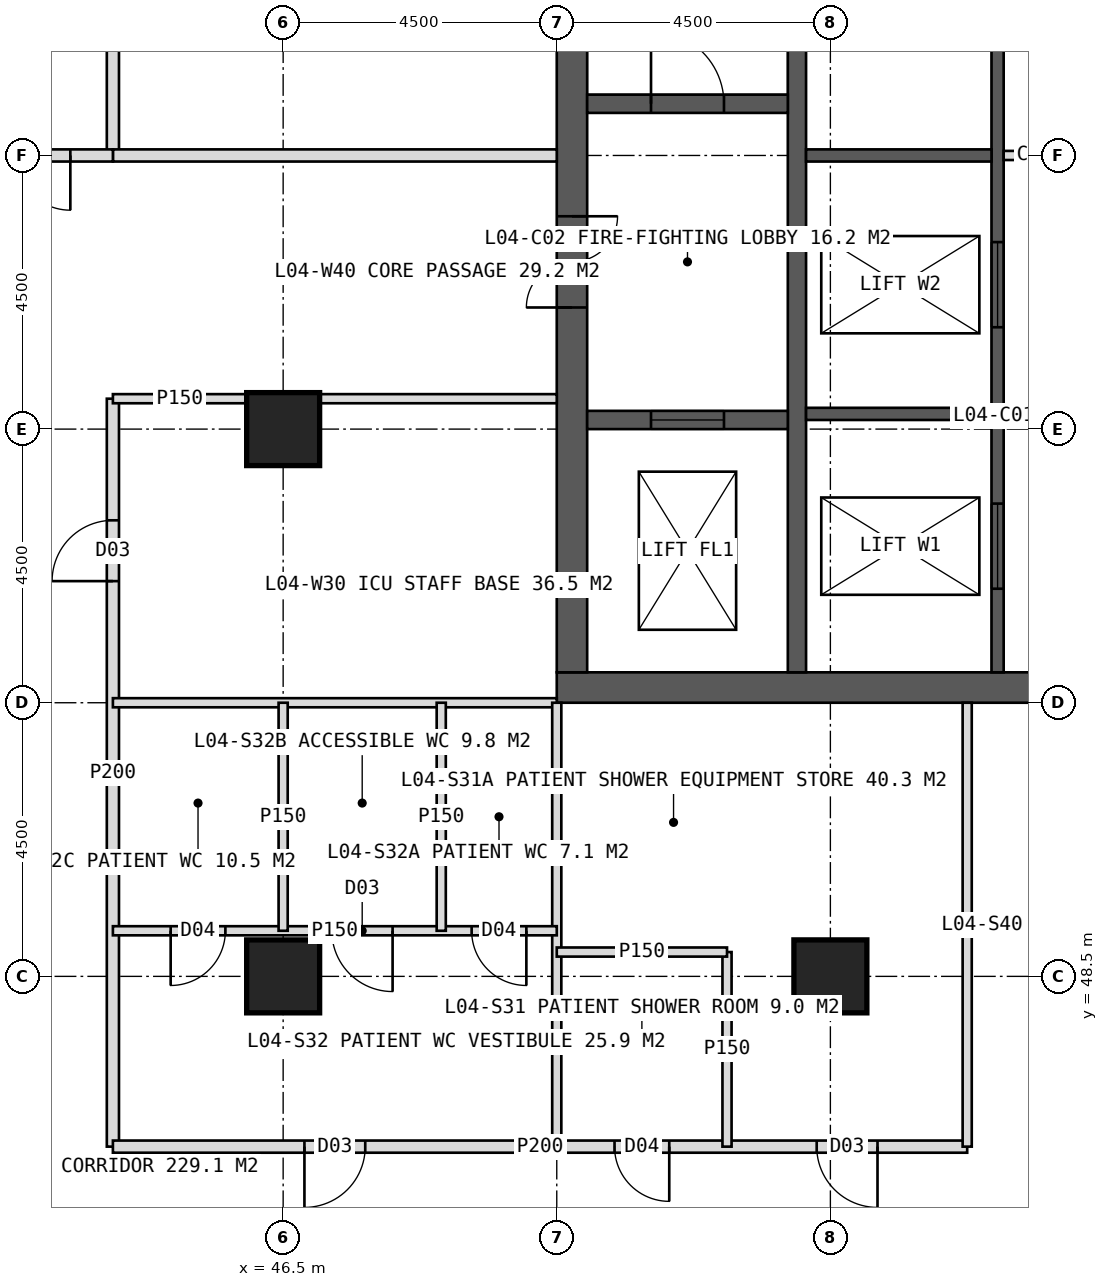
"""IFC4 building model, lengths in metres.
Left out: names, types, materials, properties, quantities, classifications, styles, units other than length and angle.
Written with IfcOpenShell. Run it as: python <this file> out.ifc"""

import sys

from ifc_helpers import new_model, si_unit, direction, frame, frame_2d, origin, origin_2d, place, context, subcontext, project, spatial, rectangle, hollow_rectangle, extrude, element, fill, save


model = new_model("IFC4")
c1 = context("Model", 3, precision=1e-05, world=origin(), true_north=direction((0.0, 1.0)))
c2 = subcontext(c1, "Body", "Model", "MODEL_VIEW")
j1 = project(units=[si_unit("LENGTHUNIT", "METRE"), si_unit("PLANEANGLEUNIT", "RADIAN")], contexts=[c1])
p1 = place(None, origin())
s1 = spatial("IfcSite", under=j1, at=p1, CompositionType="ELEMENT")
p2 = place(p1, origin())
s2 = spatial("IfcBuilding", under=s1, at=p2, CompositionType="ELEMENT")
p3 = place(p2, frame((0.0, 0.0, 21.0)))
s3 = spatial("IfcBuildingStorey", under=s2, at=p3, CompositionType="ELEMENT", Elevation=21.0)
p4 = place(p3, frame((51.0, 53.25, 0.0), z_axis=(0.0, 0.0, 1.0), x_axis=(1.0, 0.0, 0.0)))
e1 = element("IfcWall", 1, at=p4, inside=s3, PredefinedType="SHEAR", context=c2, shape_type="SweptSolid", body=[
    extrude(rectangle(XDim=18.0, YDim=0.5, at=frame_2d((9.0, 0.0))), origin(), (0.0, 0.0, 1.0), 5.0),
])
p5 = place(p4, frame((8.1, 0.0, 0.0)))
e2 = element("IfcOpeningElement", 2, at=p5, cuts=e1, PredefinedType="OPENING", context=c2, shape_type="SweptSolid", body=[
    extrude(rectangle(XDim=1.8, YDim=2.2, at=frame_2d((0.9, 1.1))), frame((0.0, 0.26, 0.0), z_axis=(0.0, -1.0, 0.0), x_axis=(1.0, 0.0, 0.0)), (0.0, 0.0, 1.0), 0.52),
])
p6 = place(p3, frame((51.25, 53.5, 0.0), z_axis=(0.0, 0.0, 1.0), x_axis=(0.0, 1.0, 0.0)))
e3 = element("IfcWall", 3, at=p6, inside=s3, PredefinedType="SHEAR", context=c2, shape_type="SweptSolid", body=[
    extrude(rectangle(XDim=17.0, YDim=0.5, at=frame_2d((8.5, 0.0))), origin(), (0.0, 0.0, 1.0), 5.0),
])
p7 = place(p6, frame((6.0, 0.0, 0.0)))
e4 = element("IfcOpeningElement", 4, at=p7, cuts=e3, PredefinedType="OPENING", context=c2, shape_type="SweptSolid", body=[
    extrude(rectangle(XDim=1.5, YDim=2.2, at=frame_2d((0.75, 1.1))), frame((0.0, 0.26, 0.0), z_axis=(0.0, -1.0, 0.0), x_axis=(1.0, 0.0, 0.0)), (0.0, 0.0, 1.0), 0.52),
])
p8 = place(p3, frame((54.95, 53.5, 0.0), z_axis=(0.0, 0.0, 1.0), x_axis=(0.0, 1.0, 0.0)))
e5 = element("IfcWall", 5, at=p8, inside=s3, PredefinedType="SHEAR", context=c2, shape_type="SweptSolid", body=[
    extrude(rectangle(XDim=17.0, YDim=0.3, at=frame_2d((8.5, 0.0))), origin(), (0.0, 0.0, 1.0), 5.0),
])
p9 = place(p3, frame((58.25, 53.5, 0.0), z_axis=(0.0, 0.0, 1.0), x_axis=(0.0, 1.0, 0.0)))
e6 = element("IfcWall", 6, at=p9, inside=s3, PredefinedType="SHEAR", context=c2, shape_type="SweptSolid", body=[
    extrude(rectangle(XDim=17.0, YDim=0.2, at=frame_2d((8.5, 0.0))), origin(), (0.0, 0.0, 1.0), 5.0),
])
p10 = place(p9, frame((1.375, 0.0, 0.0)))
e7 = element("IfcOpeningElement", 7, at=p10, cuts=e6, PredefinedType="OPENING", context=c2, shape_type="SweptSolid", body=[
    extrude(rectangle(XDim=1.4, YDim=2.2, at=frame_2d((0.7, 1.1))), frame((0.0, 0.11, 0.0), z_axis=(0.0, -1.0, 0.0), x_axis=(1.0, 0.0, 0.0)), (0.0, 0.0, 1.0), 0.22),
])
p11 = place(p9, frame((5.675, 0.0, 0.0)))
e8 = element("IfcOpeningElement", 8, at=p11, cuts=e6, PredefinedType="OPENING", context=c2, shape_type="SweptSolid", body=[
    extrude(rectangle(XDim=1.4, YDim=2.2, at=frame_2d((0.7, 1.1))), frame((0.0, 0.11, 0.0), z_axis=(0.0, -1.0, 0.0), x_axis=(1.0, 0.0, 0.0)), (0.0, 0.0, 1.0), 0.22),
])
for number, where, z_axis, x_axis in (
    (9, (55.1, 57.75, 0.0), (0.0, 0.0, 1.0), (1.0, 0.0, 0.0)),
    (10, (55.1, 62.0, 0.0), (0.0, 0.0, 1.0), (1.0, 0.0, 0.0)),
):
    element("IfcWall", number, at=place(p3, frame(where, z_axis=z_axis, x_axis=x_axis)), inside=s3, PredefinedType="SHEAR", context=c2, shape_type="SweptSolid", body=[
        extrude(rectangle(XDim=3.05, YDim=0.2, at=frame_2d((1.525, 0.0))), origin(), (0.0, 0.0, 1.0), 5.0),
    ])
p12 = place(p3, frame((51.5, 62.85, 0.0), z_axis=(0.0, 0.0, 1.0), x_axis=(1.0, 0.0, 0.0)))
e11 = element("IfcWall", 11, at=p12, inside=s3, PredefinedType="SHEAR", context=c2, shape_type="SweptSolid", body=[
    extrude(rectangle(XDim=3.3, YDim=0.3, at=frame_2d((1.65, 0.0))), origin(), (0.0, 0.0, 1.0), 5.0),
])
p13 = place(p12, frame((1.05, 0.0, 0.0)))
e12 = element("IfcOpeningElement", 12, at=p13, cuts=e11, PredefinedType="OPENING", context=c2, shape_type="SweptSolid", body=[
    extrude(rectangle(XDim=1.2, YDim=2.1, at=frame_2d((0.6, 1.05))), frame((0.0, 0.16, 0.0), z_axis=(0.0, -1.0, 0.0), x_axis=(1.0, 0.0, 0.0)), (0.0, 0.0, 1.0), 0.32),
])
p14 = place(p3, frame((51.5, 57.65, 0.0), z_axis=(0.0, 0.0, 1.0), x_axis=(1.0, 0.0, 0.0)))
e13 = element("IfcWall", 13, at=p14, inside=s3, PredefinedType="SHEAR", context=c2, shape_type="SweptSolid", body=[
    extrude(rectangle(XDim=3.3, YDim=0.3, at=frame_2d((1.65, 0.0))), origin(), (0.0, 0.0, 1.0), 5.0),
])
p15 = place(p14, frame((1.05, 0.0, 0.0)))
e14 = element("IfcOpeningElement", 14, at=p15, cuts=e13, PredefinedType="OPENING", context=c2, shape_type="SweptSolid", body=[
    extrude(rectangle(XDim=1.2, YDim=2.2, at=frame_2d((0.6, 1.1))), frame((0.0, 0.16, 0.0), z_axis=(0.0, -1.0, 0.0), x_axis=(1.0, 0.0, 0.0)), (0.0, 0.0, 1.0), 0.32),
])
for number, where, z_axis, x_axis in (
    (15, (46.5, 48.5, 0.0), (0.0, 0.0, 1.0), (1.0, 0.0, 0.0)),
    (16, (55.5, 48.5, 0.0), (0.0, 0.0, 1.0), (1.0, 0.0, 0.0)),
    (17, (46.5, 57.5, 0.0), (0.0, 0.0, 1.0), (1.0, 0.0, 0.0)),
):
    element("IfcColumn", number, at=place(p3, frame(where, z_axis=z_axis, x_axis=x_axis)), inside=s3, PredefinedType="COLUMN", context=c2, shape_type="SweptSolid", body=[
        extrude(hollow_rectangle(XDim=1.2, YDim=1.2, WallThickness=0.1, at=origin_2d()), origin(), (0.0, 0.0, 1.0), 5.0),
    ])
p16 = place(p3, frame((43.7, 45.7, 0.0), z_axis=(0.0, 0.0, 1.0), x_axis=(0.0, 1.0, 0.0)))
e18 = element("IfcWall", 18, at=p16, inside=s3, PredefinedType="PARTITIONING", context=c2, shape_type="SweptSolid", body=[
    extrude(rectangle(XDim=12.3, YDim=0.2, at=frame_2d((6.15, 0.0))), origin(), (0.0, 0.0, 1.0), 4.7),
])
p17 = place(p16, frame((9.3, 0.0, 0.0)))
e19 = element("IfcOpeningElement", 19, at=p17, cuts=e18, PredefinedType="OPENING", context=c2, shape_type="SweptSolid", body=[
    extrude(rectangle(XDim=1.0, YDim=2.1, at=frame_2d((0.5, 1.05))), frame((0.0, 0.11, 0.0), z_axis=(0.0, -1.0, 0.0), x_axis=(1.0, 0.0, 0.0)), (0.0, 0.0, 1.0), 0.22),
])
p18 = place(p3, frame((43.7, 62.0, 0.0), z_axis=(0.0, 0.0, 1.0), x_axis=(0.0, 1.0, 0.0)))
e20 = element("IfcWall", 20, at=p18, inside=s3, PredefinedType="PARTITIONING", context=c2, shape_type="SweptSolid", body=[
    extrude(rectangle(XDim=16.3, YDim=0.2, at=frame_2d((8.15, 0.0))), origin(), (0.0, 0.0, 1.0), 4.7),
])
p19 = place(p18, frame((4.0, 0.0, 0.0)))
e21 = element("IfcOpeningElement", 21, at=p19, cuts=e20, PredefinedType="OPENING", context=c2, shape_type="SweptSolid", body=[
    extrude(rectangle(XDim=1.0, YDim=2.1, at=frame_2d((0.5, 1.05))), frame((0.0, 0.11, 0.0), z_axis=(0.0, -1.0, 0.0), x_axis=(1.0, 0.0, 0.0)), (0.0, 0.0, 1.0), 0.22),
])
p20 = place(p18, frame((12.15, 0.0, 0.0)))
e22 = element("IfcOpeningElement", 22, at=p20, cuts=e20, PredefinedType="OPENING", context=c2, shape_type="SweptSolid", body=[
    extrude(rectangle(XDim=1.0, YDim=2.1, at=frame_2d((0.5, 1.05))), frame((0.0, 0.11, 0.0), z_axis=(0.0, -1.0, 0.0), x_axis=(1.0, 0.0, 0.0)), (0.0, 0.0, 1.0), 0.22),
])
p21 = place(p3, frame((51.0, 53.0, 0.0), z_axis=(0.0, 0.0, 1.0), x_axis=(-1.0, 0.0, 0.0)))
e23 = element("IfcWall", 23, at=p21, inside=s3, PredefinedType="PARTITIONING", context=c2, shape_type="SweptSolid", body=[
    extrude(rectangle(XDim=7.3, YDim=0.15, at=frame_2d((3.65, 0.0))), origin(), (0.0, 0.0, 1.0), 4.7),
])
p22 = place(p3, frame((51.0, 58.0, 0.0), z_axis=(0.0, 0.0, 1.0), x_axis=(-1.0, 0.0, 0.0)))
e24 = element("IfcWall", 24, at=p22, inside=s3, PredefinedType="PARTITIONING", context=c2, shape_type="SweptSolid", body=[
    extrude(rectangle(XDim=3.9, YDim=0.15, at=frame_2d((1.95, 0.0))), origin(), (0.0, 0.0, 1.0), 4.7),
])
p23 = place(p3, frame((45.9, 58.0, 0.0), z_axis=(0.0, 0.0, 1.0), x_axis=(-1.0, 0.0, 0.0)))
e25 = element("IfcWall", 25, at=p23, inside=s3, PredefinedType="PARTITIONING", context=c2, shape_type="SweptSolid", body=[
    extrude(rectangle(XDim=2.2, YDim=0.15, at=frame_2d((1.1, 0.0))), origin(), (0.0, 0.0, 1.0), 4.7),
])
p24 = place(p3, frame((51.0, 62.0, 0.0), z_axis=(0.0, 0.0, 1.0), x_axis=(-1.0, 0.0, 0.0)))
e26 = element("IfcWall", 26, at=p24, inside=s3, PredefinedType="SOLIDWALL", context=c2, shape_type="SweptSolid", body=[
    extrude(rectangle(XDim=7.3, YDim=0.2, at=frame_2d((3.65, 0.0))), origin(), (0.0, 0.0, 1.0), 3.7),
])
p25 = place(p3, frame((57.75, 45.7, 0.0), z_axis=(0.0, 0.0, 1.0), x_axis=(-1.0, 0.0, 0.0)))
e27 = element("IfcWall", 27, at=p25, inside=s3, PredefinedType="PARTITIONING", context=c2, shape_type="SweptSolid", body=[
    extrude(rectangle(XDim=14.05, YDim=0.2, at=frame_2d((7.025, 0.0))), origin(), (0.0, 0.0, 1.0), 4.7),
])
p26 = place(p25, frame((9.9, 0.0, 0.0)))
e28 = element("IfcOpeningElement", 28, at=p26, cuts=e27, PredefinedType="OPENING", context=c2, shape_type="SweptSolid", body=[
    extrude(rectangle(XDim=1.0, YDim=2.1, at=frame_2d((0.5, 1.05))), frame((0.0, 0.11, 0.0), z_axis=(0.0, -1.0, 0.0), x_axis=(1.0, 0.0, 0.0)), (0.0, 0.0, 1.0), 0.22),
])
p27 = place(p25, frame((4.9, 0.0, 0.0)))
e29 = element("IfcOpeningElement", 29, at=p27, cuts=e27, PredefinedType="OPENING", context=c2, shape_type="SweptSolid", body=[
    extrude(rectangle(XDim=0.9, YDim=2.1, at=frame_2d((0.45, 1.05))), frame((0.0, 0.11, 0.0), z_axis=(0.0, -1.0, 0.0), x_axis=(1.0, 0.0, 0.0)), (0.0, 0.0, 1.0), 0.22),
])
p28 = place(p25, frame((1.475, 0.0, 0.0)))
e30 = element("IfcOpeningElement", 30, at=p28, cuts=e27, PredefinedType="OPENING", context=c2, shape_type="SweptSolid", body=[
    extrude(rectangle(XDim=1.0, YDim=2.1, at=frame_2d((0.5, 1.05))), frame((0.0, 0.11, 0.0), z_axis=(0.0, -1.0, 0.0), x_axis=(1.0, 0.0, 0.0)), (0.0, 0.0, 1.0), 0.22),
])
for number, where, z_axis, x_axis in (
    (31, (57.75, 53.0, 0.0), (0.0, 0.0, 1.0), (0.0, -1.0, 0.0)),
    (32, (51.0, 53.0, 0.0), (0.0, 0.0, 1.0), (0.0, -1.0, 0.0)),
):
    element("IfcWall", number, at=place(p3, frame(where, z_axis=z_axis, x_axis=x_axis)), inside=s3, PredefinedType="PARTITIONING", context=c2, shape_type="SweptSolid", body=[
        extrude(rectangle(XDim=7.3, YDim=0.15, at=frame_2d((3.65, 0.0))), origin(), (0.0, 0.0, 1.0), 4.7),
    ])
p29 = place(p3, frame((53.8, 48.9, 0.0), z_axis=(0.0, 0.0, 1.0), x_axis=(0.0, -1.0, 0.0)))
e33 = element("IfcWall", 33, at=p29, inside=s3, PredefinedType="PARTITIONING", context=c2, shape_type="SweptSolid", body=[
    extrude(rectangle(XDim=3.2, YDim=0.15, at=frame_2d((1.6, 0.0))), origin(), (0.0, 0.0, 1.0), 4.7),
])
p30 = place(p3, frame((53.8, 48.9, 0.0), z_axis=(0.0, 0.0, 1.0), x_axis=(-1.0, 0.0, 0.0)))
e34 = element("IfcWall", 34, at=p30, inside=s3, PredefinedType="PARTITIONING", context=c2, shape_type="SweptSolid", body=[
    extrude(rectangle(XDim=2.8, YDim=0.15, at=frame_2d((1.4, 0.0))), origin(), (0.0, 0.0, 1.0), 4.7),
])
p31 = place(p3, frame((51.0, 49.25, 0.0), z_axis=(0.0, 0.0, 1.0), x_axis=(-1.0, 0.0, 0.0)))
e35 = element("IfcWall", 35, at=p31, inside=s3, PredefinedType="PARTITIONING", context=c2, shape_type="SweptSolid", body=[
    extrude(rectangle(XDim=7.3, YDim=0.15, at=frame_2d((3.65, 0.0))), origin(), (0.0, 0.0, 1.0), 4.7),
])
p32 = place(p31, frame((0.5, 0.0, 0.0)))
e36 = element("IfcOpeningElement", 36, at=p32, cuts=e35, PredefinedType="OPENING", context=c2, shape_type="SweptSolid", body=[
    extrude(rectangle(XDim=0.9, YDim=2.1, at=frame_2d((0.45, 1.05))), frame((0.0, 0.085, 0.0), z_axis=(0.0, -1.0, 0.0), x_axis=(1.0, 0.0, 0.0)), (0.0, 0.0, 1.0), 0.17),
])
p33 = place(p31, frame((2.7, 0.0, 0.0)))
e37 = element("IfcOpeningElement", 37, at=p33, cuts=e35, PredefinedType="OPENING", context=c2, shape_type="SweptSolid", body=[
    extrude(rectangle(XDim=1.0, YDim=2.1, at=frame_2d((0.5, 1.05))), frame((0.0, 0.085, 0.0), z_axis=(0.0, -1.0, 0.0), x_axis=(1.0, 0.0, 0.0)), (0.0, 0.0, 1.0), 0.17),
])
p34 = place(p31, frame((5.45, 0.0, 0.0)))
e38 = element("IfcOpeningElement", 38, at=p34, cuts=e35, PredefinedType="OPENING", context=c2, shape_type="SweptSolid", body=[
    extrude(rectangle(XDim=0.9, YDim=2.1, at=frame_2d((0.45, 1.05))), frame((0.0, 0.085, 0.0), z_axis=(0.0, -1.0, 0.0), x_axis=(1.0, 0.0, 0.0)), (0.0, 0.0, 1.0), 0.17),
])
p35 = place(p3, frame((49.1, 53.0, 0.0), z_axis=(0.0, 0.0, 1.0), x_axis=(0.0, -1.0, 0.0)))
e39 = element("IfcWall", 39, at=p35, inside=s3, PredefinedType="PARTITIONING", context=c2, shape_type="SweptSolid", body=[
    extrude(rectangle(XDim=3.75, YDim=0.15, at=frame_2d((1.875, 0.0))), origin(), (0.0, 0.0, 1.0), 4.7),
])
p36 = place(p3, frame((46.5, 53.0, 0.0), z_axis=(0.0, 0.0, 1.0), x_axis=(0.0, -1.0, 0.0)))
e40 = element("IfcWall", 40, at=p36, inside=s3, PredefinedType="PARTITIONING", context=c2, shape_type="SweptSolid", body=[
    extrude(rectangle(XDim=3.75, YDim=0.15, at=frame_2d((1.875, 0.0))), origin(), (0.0, 0.0, 1.0), 3.7),
])
p37 = place(p3, frame((43.7, 62.0, 0.0), z_axis=(0.0, 0.0, 1.0), x_axis=(-1.0, 0.0, 0.0)))
e41 = element("IfcWall", 41, at=p37, inside=s3, PredefinedType="SOLIDWALL", context=c2, shape_type="SweptSolid", body=[
    extrude(rectangle(XDim=3.2, YDim=0.2, at=frame_2d((1.6, 0.0))), origin(), (0.0, 0.0, 1.0), 3.7),
])
p38 = place(p37, frame((0.7, 0.0, 0.0)))
e42 = element("IfcOpeningElement", 42, at=p38, cuts=e41, PredefinedType="OPENING", context=c2, shape_type="SweptSolid", body=[
    extrude(rectangle(XDim=1.8, YDim=2.2, at=frame_2d((0.9, 1.1))), frame((0.0, 0.11, 0.0), z_axis=(0.0, -1.0, 0.0), x_axis=(1.0, 0.0, 0.0)), (0.0, 0.0, 1.0), 0.22),
])
p39 = place(p3, frame((58.35, 62.0, 0.0), z_axis=(0.0, 0.0, 1.0), x_axis=(1.0, 0.0, 0.0)))
e43 = element("IfcWall", 43, at=p39, inside=s3, PredefinedType="PARTITIONING", context=c2, shape_type="SweptSolid", body=[
    extrude(rectangle(XDim=3.3, YDim=0.15, at=frame_2d((1.65, 0.0))), origin(), (0.0, 0.0, 1.0), 4.7),
])
p40 = place(p39, frame((1.15, 0.0, 0.0)))
e44 = element("IfcOpeningElement", 44, at=p40, cuts=e43, PredefinedType="OPENING", context=c2, shape_type="SweptSolid", body=[
    extrude(rectangle(XDim=1.0, YDim=2.1, at=frame_2d((0.5, 1.05))), frame((0.0, 0.085, 0.0), z_axis=(0.0, -1.0, 0.0), x_axis=(1.0, 0.0, 0.0)), (0.0, 0.0, 1.0), 0.17),
])
p41 = place(p17, origin())
e45 = element("IfcDoor", 45, at=p41, inside=s3, OperationType="SINGLE_SWING_LEFT", PredefinedType="DOOR", context=c2, shape_type="SweptSolid", body=[
    extrude(rectangle(XDim=1.0, YDim=2.1, at=frame_2d((0.5, 1.05))), frame((0.0, 0.025, 0.0), z_axis=(0.0, -1.0, 0.0), x_axis=(1.0, 0.0, 0.0)), (0.0, 0.0, 1.0), 0.05),
])
fill(e19, e45)
p42 = place(p26, origin())
e46 = element("IfcDoor", 46, at=p42, inside=s3, OperationType="SINGLE_SWING_RIGHT", PredefinedType="DOOR", context=c2, shape_type="SweptSolid", body=[
    extrude(rectangle(XDim=1.0, YDim=2.1, at=frame_2d((0.5, 1.05))), frame((0.0, 0.025, 0.0), z_axis=(0.0, -1.0, 0.0), x_axis=(1.0, 0.0, 0.0)), (0.0, 0.0, 1.0), 0.05),
])
fill(e28, e46)
p43 = place(p38, origin())
e47 = element("IfcDoor", 47, at=p43, inside=s3, OperationType="DOUBLE_DOOR_DOUBLE_SWING", PredefinedType="DOOR", context=c2, shape_type="SweptSolid", body=[
    extrude(rectangle(XDim=1.8, YDim=2.2, at=frame_2d((0.9, 1.1))), frame((0.0, 0.025, 0.0), z_axis=(0.0, -1.0, 0.0), x_axis=(1.0, 0.0, 0.0)), (0.0, 0.0, 1.0), 0.05),
])
fill(e42, e47)
p44 = place(p7, origin())
e48 = element("IfcDoor", 48, at=p44, inside=s3, OperationType="DOUBLE_DOOR_SINGLE_SWING", PredefinedType="DOOR", context=c2, shape_type="SweptSolid", body=[
    extrude(rectangle(XDim=1.5, YDim=2.2, at=frame_2d((0.75, 1.1))), frame((0.0, 0.025, 0.0), z_axis=(0.0, -1.0, 0.0), x_axis=(1.0, 0.0, 0.0)), (0.0, 0.0, 1.0), 0.05),
])
fill(e4, e48)
p45 = place(p13, origin())
e49 = element("IfcDoor", 49, at=p45, inside=s3, OperationType="SINGLE_SWING_LEFT", PredefinedType="DOOR", context=c2, shape_type="SweptSolid", body=[
    extrude(rectangle(XDim=1.2, YDim=2.1, at=frame_2d((0.6, 1.05))), frame((0.0, 0.025, 0.0), z_axis=(0.0, -1.0, 0.0), x_axis=(1.0, 0.0, 0.0)), (0.0, 0.0, 1.0), 0.05),
])
fill(e12, e49)
p46 = place(p15, origin())
e50 = element("IfcDoor", 50, at=p46, inside=s3, OperationType="SLIDING_TO_LEFT", PredefinedType="DOOR", context=c2, shape_type="SweptSolid", body=[
    extrude(rectangle(XDim=1.2, YDim=2.2, at=frame_2d((0.6, 1.1))), frame((0.0, 0.025, 0.0), z_axis=(0.0, -1.0, 0.0), x_axis=(1.0, 0.0, 0.0)), (0.0, 0.0, 1.0), 0.05),
])
fill(e14, e50)
p47 = place(p10, origin())
e51 = element("IfcDoor", 51, at=p47, inside=s3, OperationType="SLIDING_TO_LEFT", PredefinedType="DOOR", context=c2, shape_type="SweptSolid", body=[
    extrude(rectangle(XDim=1.4, YDim=2.2, at=frame_2d((0.7, 1.1))), frame((0.0, 0.025, 0.0), z_axis=(0.0, -1.0, 0.0), x_axis=(1.0, 0.0, 0.0)), (0.0, 0.0, 1.0), 0.05),
])
fill(e7, e51)
p48 = place(p11, origin())
e52 = element("IfcDoor", 52, at=p48, inside=s3, OperationType="SLIDING_TO_LEFT", PredefinedType="DOOR", context=c2, shape_type="SweptSolid", body=[
    extrude(rectangle(XDim=1.4, YDim=2.2, at=frame_2d((0.7, 1.1))), frame((0.0, 0.025, 0.0), z_axis=(0.0, -1.0, 0.0), x_axis=(1.0, 0.0, 0.0)), (0.0, 0.0, 1.0), 0.05),
])
fill(e8, e52)
p49 = place(p27, origin())
e53 = element("IfcDoor", 53, at=p49, inside=s3, OperationType="SINGLE_SWING_LEFT", PredefinedType="DOOR", context=c2, shape_type="SweptSolid", body=[
    extrude(rectangle(XDim=0.9, YDim=2.1, at=frame_2d((0.45, 1.05))), frame((0.0, 0.025, 0.0), z_axis=(0.0, -1.0, 0.0), x_axis=(1.0, 0.0, 0.0)), (0.0, 0.0, 1.0), 0.05),
])
fill(e29, e53)
p50 = place(p28, origin())
e54 = element("IfcDoor", 54, at=p50, inside=s3, OperationType="SINGLE_SWING_LEFT", PredefinedType="DOOR", context=c2, shape_type="SweptSolid", body=[
    extrude(rectangle(XDim=1.0, YDim=2.1, at=frame_2d((0.5, 1.05))), frame((0.0, 0.025, 0.0), z_axis=(0.0, -1.0, 0.0), x_axis=(1.0, 0.0, 0.0)), (0.0, 0.0, 1.0), 0.05),
])
fill(e30, e54)
p51 = place(p32, origin())
e55 = element("IfcDoor", 55, at=p51, inside=s3, OperationType="SINGLE_SWING_LEFT", PredefinedType="DOOR", context=c2, shape_type="SweptSolid", body=[
    extrude(rectangle(XDim=0.9, YDim=2.1, at=frame_2d((0.45, 1.05))), frame((0.0, 0.025, 0.0), z_axis=(0.0, -1.0, 0.0), x_axis=(1.0, 0.0, 0.0)), (0.0, 0.0, 1.0), 0.05),
])
fill(e36, e55)
p52 = place(p33, origin())
e56 = element("IfcDoor", 56, at=p52, inside=s3, OperationType="SINGLE_SWING_LEFT", PredefinedType="DOOR", context=c2, shape_type="SweptSolid", body=[
    extrude(rectangle(XDim=1.0, YDim=2.1, at=frame_2d((0.5, 1.05))), frame((0.0, 0.025, 0.0), z_axis=(0.0, -1.0, 0.0), x_axis=(1.0, 0.0, 0.0)), (0.0, 0.0, 1.0), 0.05),
])
fill(e37, e56)
p53 = place(p34, origin())
e57 = element("IfcDoor", 57, at=p53, inside=s3, OperationType="SINGLE_SWING_RIGHT", PredefinedType="DOOR", context=c2, shape_type="SweptSolid", body=[
    extrude(rectangle(XDim=0.9, YDim=2.1, at=frame_2d((0.45, 1.05))), frame((0.0, 0.025, 0.0), z_axis=(0.0, -1.0, 0.0), x_axis=(1.0, 0.0, 0.0)), (0.0, 0.0, 1.0), 0.05),
])
fill(e38, e57)
save(model, sys.argv[1])
